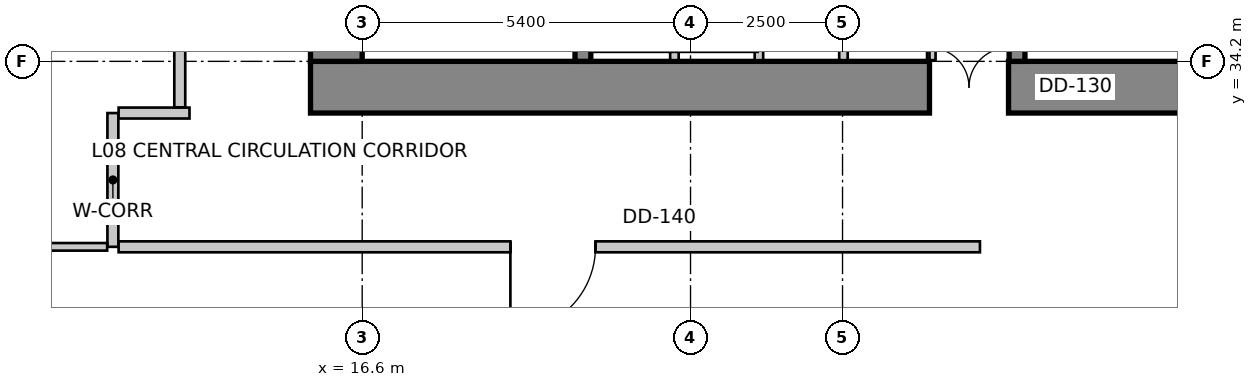
"""IFC4 building model, lengths in metres.
Left out: names, types, materials, properties, quantities, classifications, styles, units other than length and angle.
Written with IfcOpenShell. Run it as: python <this file> out.ifc"""

import sys

from ifc_helpers import new_model, si_unit, direction, frame, frame_2d, origin, place, context, subcontext, project, spatial, rectangle, extrude, source, transform, mapped, element, fill, save


model = new_model("IFC4")
c1 = context("Model", 3, precision=1e-05, world=origin(), true_north=direction((0.0, 1.0)))
c2 = subcontext(c1, "Body", "Model", "MODEL_VIEW")
j1 = project(units=[si_unit("LENGTHUNIT", "METRE"), si_unit("PLANEANGLEUNIT", "RADIAN")], contexts=[c1])
p1 = place(None, origin())
s1 = spatial("IfcSite", under=j1, at=p1, CompositionType="ELEMENT")
p2 = place(p1, origin())
s2 = spatial("IfcBuilding", under=s1, at=p2, CompositionType="ELEMENT")
p3 = place(p2, frame((0.0, 0.0, 35.0)))
s3 = spatial("IfcBuildingStorey", under=s2, at=p3, CompositionType="ELEMENT", Elevation=35.0)
p4 = place(p3, frame((15.75, 33.775, 0.0), z_axis=(0.0, 0.0, 1.0), x_axis=(1.0, 0.0, 0.0)))
e1 = element("IfcWall", 1, at=p4, inside=s3, PredefinedType="SHEAR", context=c2, shape_type="SweptSolid", body=[
    extrude(rectangle(XDim=16.1, YDim=0.85, at=frame_2d((8.05, 0.0))), origin(), (0.0, 0.0, 1.0), 4.0),
])
m1 = source(origin(), c2, "Body", "SweptSolid", [
    extrude(rectangle(XDim=1.3, YDim=2.15, at=frame_2d((0.65, 1.075))), frame((0.0, 0.435, 0.0), z_axis=(0.0, -1.0, 0.0), x_axis=(1.0, 0.0, 0.0)), (0.0, 0.0, 1.0), 0.87),
])
p5 = place(p4, frame((10.18, 0.0, 0.0)))
e2 = element("IfcOpeningElement", 2, at=p5, cuts=e1, PredefinedType="OPENING", context=c2, shape_type="MappedRepresentation", body=[
    mapped(m1, transform((0.0, 0.0, 0.0), scale=1.0)),
])
p6 = place(p3, frame((16.175, 34.2, 0.0), z_axis=(0.0, 0.0, 1.0), x_axis=(0.0, 1.0, 0.0)))
e3 = element("IfcWall", 3, at=p6, inside=s3, PredefinedType="SHEAR", context=c2, shape_type="SweptSolid", body=[
    extrude(rectangle(XDim=11.4, YDim=0.85, at=frame_2d((5.7, 0.0))), origin(), (0.0, 0.0, 1.0), 4.0),
])
m2 = source(origin(), c2, "Body", "SweptSolid", [
    extrude(rectangle(XDim=1.1, YDim=2.15, at=frame_2d((0.55, 1.075))), frame((0.0, 0.435, 0.0), z_axis=(0.0, -1.0, 0.0), x_axis=(1.0, 0.0, 0.0)), (0.0, 0.0, 1.0), 0.87),
])
p7 = place(p6, frame((7.15, 0.0, 0.0)))
e4 = element("IfcOpeningElement", 4, at=p7, cuts=e3, PredefinedType="OPENING", context=c2, shape_type="MappedRepresentation", body=[
    mapped(m2, transform((0.0, 0.0, 0.0), scale=1.0)),
])
p8 = place(p3, frame((20.23, 34.2, 0.0), z_axis=(0.0, 0.0, 1.0), x_axis=(0.0, 1.0, 0.0)))
e5 = element("IfcWall", 5, at=p8, inside=s3, PredefinedType="SHEAR", context=c2, shape_type="SweptSolid", body=[
    extrude(rectangle(XDim=9.06, YDim=0.26, at=frame_2d((4.53, 0.0))), origin(), (0.0, 0.0, 1.0), 4.0),
])
m3 = source(origin(), c2, "Body", "SweptSolid", [
    extrude(rectangle(XDim=1.1, YDim=2.15, at=frame_2d((0.55, 1.075))), frame((0.0, 0.14, 0.0), z_axis=(0.0, -1.0, 0.0), x_axis=(1.0, 0.0, 0.0)), (0.0, 0.0, 1.0), 0.28),
])
p9 = place(p8, frame((7.45, 0.0, 0.0)))
e6 = element("IfcOpeningElement", 6, at=p9, cuts=e5, PredefinedType="OPENING", context=c2, shape_type="MappedRepresentation", body=[
    mapped(m3, transform((0.0, 0.0, 0.0), scale=1.0)),
])
p10 = place(p3, frame((27.37, 34.2, 0.0), z_axis=(0.0, 0.0, 1.0), x_axis=(0.0, 1.0, 0.0)))
e7 = element("IfcWall", 7, at=p10, inside=s3, PredefinedType="SHEAR", context=c2, shape_type="SweptSolid", body=[
    extrude(rectangle(XDim=9.06, YDim=0.26, at=frame_2d((4.53, 0.0))), origin(), (0.0, 0.0, 1.0), 4.0),
])
p11 = place(p10, frame((7.45, 0.0, 0.0)))
e8 = element("IfcOpeningElement", 8, at=p11, cuts=e7, PredefinedType="OPENING", context=c2, shape_type="MappedRepresentation", body=[
    mapped(m3, transform((0.0, 0.0, 0.0), scale=1.0)),
])
p12 = place(p3, frame((13.269, 47.134, 0.0), z_axis=(0.0, 0.0, 1.0), x_axis=(-0.319920423265, -0.947444416722, 0.0)))
e9 = element("IfcWall", 9, at=p12, inside=s3, PredefinedType="SOLIDWALL", context=c2, shape_type="SweptSolid", body=[
    extrude(rectangle(XDim=16.135, YDim=0.3, at=frame_2d((8.067, 0.0))), origin(), (0.0, 0.0, 1.0), 3.75),
])
m4 = source(origin(), c2, "Body", "SweptSolid", [
    extrude(rectangle(XDim=2.8, YDim=2.4, at=frame_2d((1.4, 1.2))), frame((0.0, 0.16, 0.0), z_axis=(0.0, -1.0, 0.0), x_axis=(1.0, 0.0, 0.0)), (0.0, 0.0, 1.0), 0.32),
])
p13 = place(p12, frame((1.988, 0.0, 0.85)))
e10 = element("IfcOpeningElement", 10, at=p13, cuts=e9, PredefinedType="OPENING", context=c2, shape_type="MappedRepresentation", body=[
    mapped(m4, transform((0.0, 0.0, 0.0), scale=1.0)),
])
m5 = source(origin(), c2, "Body", "SweptSolid", [
    extrude(rectangle(XDim=2.4, YDim=2.2, at=frame_2d((1.2, 1.1))), frame((0.0, 0.16, 0.0), z_axis=(0.0, -1.0, 0.0), x_axis=(1.0, 0.0, 0.0)), (0.0, 0.0, 1.0), 0.32),
])
p14 = place(p12, frame((7.159, 0.0, 0.85)))
e11 = element("IfcOpeningElement", 11, at=p14, cuts=e9, PredefinedType="OPENING", context=c2, shape_type="MappedRepresentation", body=[
    mapped(m5, transform((0.0, 0.0, 0.0), scale=1.0)),
])
p15 = place(p12, frame((11.93, 0.0, 0.85)))
e12 = element("IfcOpeningElement", 12, at=p15, cuts=e9, PredefinedType="OPENING", context=c2, shape_type="MappedRepresentation", body=[
    mapped(m4, transform((0.0, 0.0, 0.0), scale=1.0)),
])
p16 = place(p3, frame((8.183, 31.833, 0.0), z_axis=(0.0, 0.0, 1.0), x_axis=(0.18216364648, -0.983268226834, 0.0)))
e13 = element("IfcWall", 13, at=p16, inside=s3, PredefinedType="SOLIDWALL", context=c2, shape_type="SweptSolid", body=[
    extrude(rectangle(XDim=26.678, YDim=0.3, at=frame_2d((13.339, 0.0))), origin(), (0.0, 0.0, 1.0), 3.75),
])
p17 = place(p16, frame((2.401, 0.0, 0.85)))
e14 = element("IfcOpeningElement", 14, at=p17, cuts=e13, PredefinedType="OPENING", context=c2, shape_type="MappedRepresentation", body=[
    mapped(m5, transform((0.0, 0.0, 0.0), scale=1.0)),
])
p18 = place(p16, frame((7.529, 0.0, 0.85)))
e15 = element("IfcOpeningElement", 15, at=p18, cuts=e13, PredefinedType="OPENING", context=c2, shape_type="MappedRepresentation", body=[
    mapped(m4, transform((0.0, 0.0, 0.0), scale=1.0)),
])
p19 = place(p16, frame((13.057, 0.0, 0.85)))
e16 = element("IfcOpeningElement", 16, at=p19, cuts=e13, PredefinedType="OPENING", context=c2, shape_type="MappedRepresentation", body=[
    mapped(m5, transform((0.0, 0.0, 0.0), scale=1.0)),
])
p20 = place(p16, frame((18.411, 0.0, 0.85)))
e17 = element("IfcOpeningElement", 17, at=p20, cuts=e13, PredefinedType="OPENING", context=c2, shape_type="MappedRepresentation", body=[
    mapped(m5, transform((0.0, 0.0, 0.0), scale=1.0)),
])
p21 = place(p16, frame((22.709, 0.0, 0.85)))
e18 = element("IfcOpeningElement", 18, at=p21, cuts=e13, PredefinedType="OPENING", context=c2, shape_type="MappedRepresentation", body=[
    mapped(m4, transform((0.0, 0.0, 0.0), scale=1.0)),
])
for number, where, z_axis, x_axis in (
    (19, (25.96, 34.22, 0.0), (0.0, 0.0, 1.0), (0.0, 1.0, 0.0)),
    (20, (21.735, 34.22, 0.0), (0.0, 0.0, 1.0), (0.0, 1.0, 0.0)),
    (21, (23.125, 34.22, 0.0), (0.0, 0.0, 1.0), (0.0, 1.0, 0.0)),
    (22, (24.515, 34.22, 0.0), (0.0, 0.0, 1.0), (0.0, 1.0, 0.0)),
):
    element("IfcWall", number, at=place(p3, frame(where, z_axis=z_axis, x_axis=x_axis)), inside=s3, PredefinedType="SOLIDWALL", context=c2, shape_type="SweptSolid", body=[
        extrude(rectangle(XDim=1.62, YDim=0.14, at=frame_2d((0.81, 0.0))), origin(), (0.0, 0.0, 1.0), 3.042),
    ])
p22 = place(p3, frame((12.5, 31.15, 0.0), z_axis=(0.0, 0.0, 1.0), x_axis=(0.0, 1.0, 0.0)))
e23 = element("IfcWall", 23, at=p22, inside=s3, PredefinedType="PARTITIONING", context=c2, shape_type="SweptSolid", body=[
    extrude(rectangle(XDim=2.2, YDim=0.18, at=frame_2d((1.1, 0.0))), origin(), (0.0, 0.0, 1.0), 3.434),
])
p23 = place(p3, frame((12.594, 33.35, 0.0), z_axis=(0.0, 0.0, 1.0), x_axis=(1.0, 0.0, 0.0)))
e24 = element("IfcWall", 24, at=p23, inside=s3, PredefinedType="PARTITIONING", context=c2, shape_type="SweptSolid", body=[
    extrude(rectangle(XDim=1.166, YDim=0.18, at=frame_2d((0.583, 0.0))), origin(), (0.0, 0.0, 1.0), 3.75),
])
p24 = place(p3, frame((26.76, 31.15, 0.0), z_axis=(0.0, 0.0, 1.0), x_axis=(-1.0, 0.0, 0.0)))
e25 = element("IfcWall", 25, at=p24, inside=s3, PredefinedType="PARTITIONING", context=c2, shape_type="SweptSolid", body=[
    extrude(rectangle(XDim=14.166, YDim=0.18, at=frame_2d((7.083, 0.0))), origin(), (0.0, 0.0, 1.0), 3.434),
])
m6 = source(origin(), c2, "Body", "SweptSolid", [
    extrude(rectangle(XDim=1.4, YDim=2.15, at=frame_2d((0.7, 1.075))), frame((0.0, 0.1, 0.0), z_axis=(0.0, -1.0, 0.0), x_axis=(1.0, 0.0, 0.0)), (0.0, 0.0, 1.0), 0.2),
])
p25 = place(p24, frame((6.323, 0.0, 0.0)))
e26 = element("IfcOpeningElement", 26, at=p25, cuts=e25, PredefinedType="OPENING", context=c2, shape_type="MappedRepresentation", body=[
    mapped(m6, transform((0.0, 0.0, 0.0), scale=1.0)),
])
p26 = place(p3, frame((13.6, 33.444, 0.0), z_axis=(0.0, 0.0, 1.0), x_axis=(0.0, 1.0, 0.0)))
e27 = element("IfcWall", 27, at=p26, inside=s3, PredefinedType="PARTITIONING", context=c2, shape_type="SweptSolid", body=[
    extrude(rectangle(XDim=13.896, YDim=0.18, at=frame_2d((6.948, 0.0))), origin(), (0.0, 0.0, 1.0), 2.892),
])
m7 = source(origin(), c2, "Body", "SweptSolid", [
    extrude(rectangle(XDim=0.9, YDim=2.15, at=frame_2d((0.45, 1.075))), frame((0.0, 0.1, 0.0), z_axis=(0.0, -1.0, 0.0), x_axis=(1.0, 0.0, 0.0)), (0.0, 0.0, 1.0), 0.2),
])
p27 = place(p26, frame((4.144, 0.0, 0.0)))
e28 = element("IfcOpeningElement", 28, at=p27, cuts=e27, PredefinedType="OPENING", context=c2, shape_type="MappedRepresentation", body=[
    mapped(m7, transform((0.0, 0.0, 0.0), scale=1.0)),
])
p28 = place(p3, frame((12.406, 31.15, 0.0), z_axis=(0.0, 0.0, 1.0), x_axis=(-1.0, 0.0, 0.0)))
e29 = element("IfcWall", 29, at=p28, inside=s3, PredefinedType="PARTITIONING", context=c2, shape_type="SweptSolid", body=[
    extrude(rectangle(XDim=3.979, YDim=0.125, at=frame_2d((1.99, 0.0))), origin(), (0.0, 0.0, 1.0), 2.892),
])
m8 = source(origin(), c2, "Body", "SweptSolid", [
    extrude(rectangle(XDim=1.3, YDim=2.15, at=frame_2d((0.65, 1.075))), frame((0.0, 0.025, 0.0), z_axis=(0.0, -1.0, 0.0), x_axis=(1.0, 0.0, 0.0)), (0.0, 0.0, 1.0), 0.05),
])
p29 = place(p5, origin())
e30 = element("IfcDoor", 30, at=p29, inside=s3, OperationType="DOUBLE_DOOR_SINGLE_SWING", PredefinedType="DOOR", context=c2, shape_type="MappedRepresentation", body=[
    mapped(m8, transform((0.0, 0.0, 0.0), scale=1.0)),
])
fill(e2, e30)
m9 = source(origin(), c2, "Body", "SweptSolid", [
    extrude(rectangle(XDim=1.4, YDim=2.15, at=frame_2d((0.7, 1.075))), frame((0.0, 0.025, 0.0), z_axis=(0.0, -1.0, 0.0), x_axis=(1.0, 0.0, 0.0)), (0.0, 0.0, 1.0), 0.05),
])
p30 = place(p25, origin())
e31 = element("IfcDoor", 31, at=p30, inside=s3, OperationType="SINGLE_SWING_RIGHT", PredefinedType="DOOR", context=c2, shape_type="MappedRepresentation", body=[
    mapped(m9, transform((0.0, 0.0, 0.0), scale=1.0)),
])
fill(e26, e31)
save(model, sys.argv[1])
